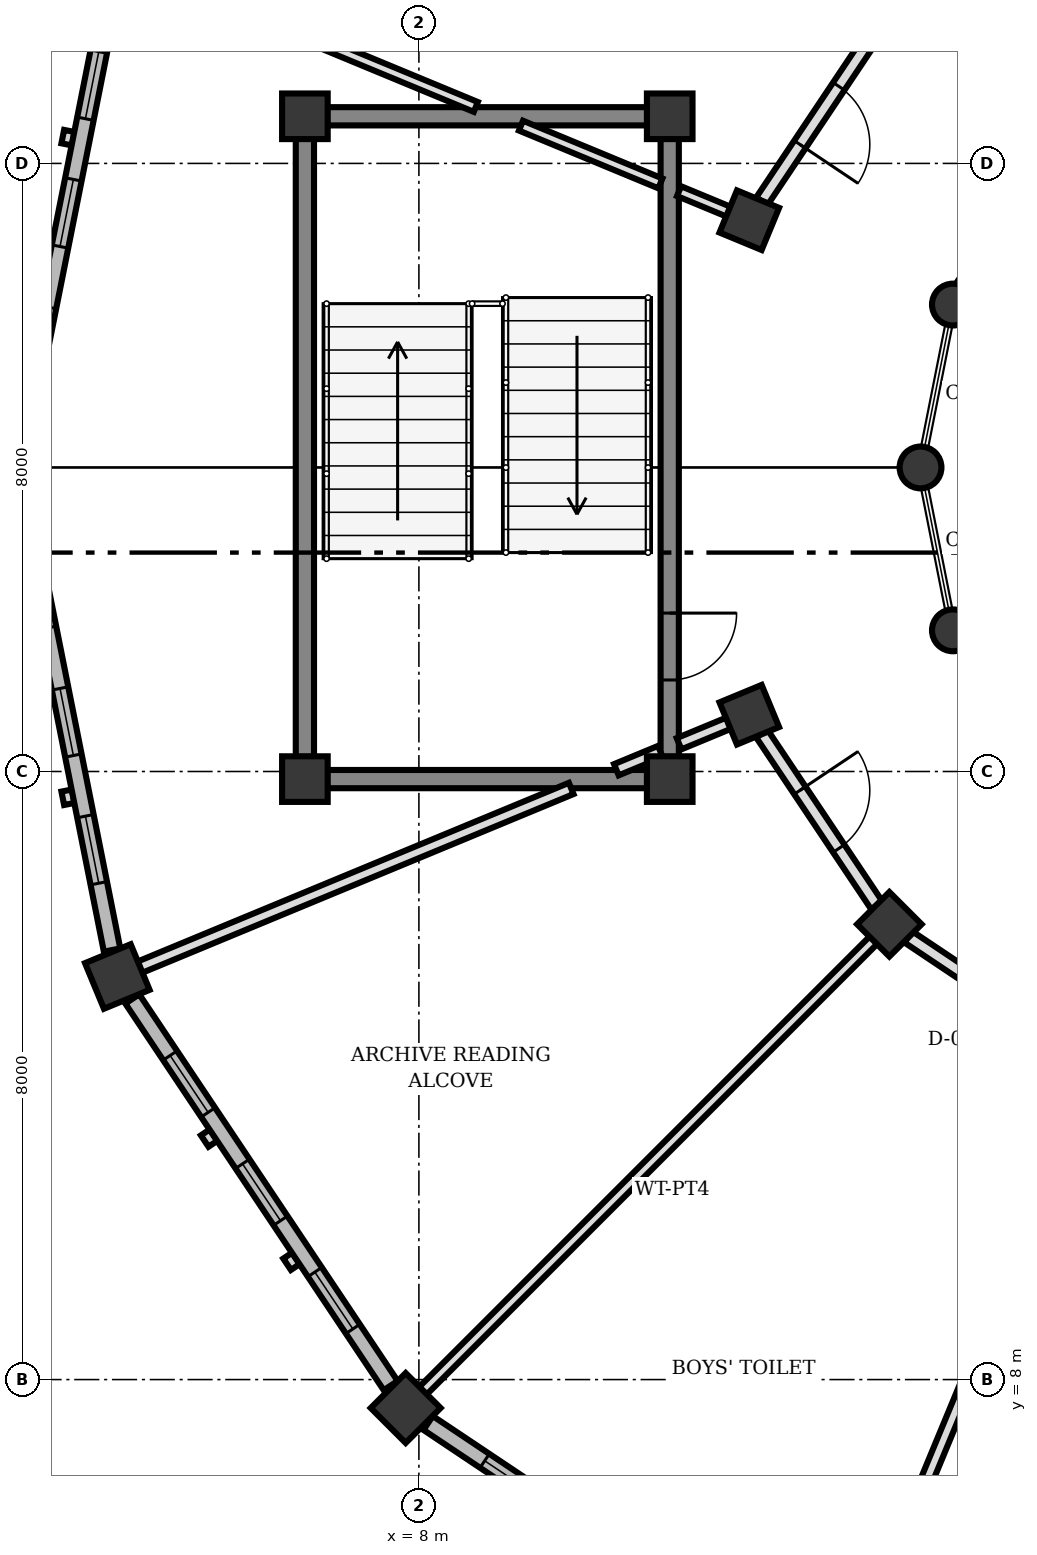
"""IFC4 building model, lengths in metres.
Left out: names, types, materials, properties, quantities, classifications, styles, units other than length and angle.
Written with IfcOpenShell. Run it as: python <this file> out.ifc"""

import sys

from ifc_helpers import new_model, si_unit, direction, frame, frame_2d, origin, origin_2d, place, context, subcontext, project, spatial, rectangle, circle, extrude, element, fill, save


model = new_model("IFC4")
c1 = context("Model", 3, precision=1e-05, world=origin(), true_north=direction((0.0, 1.0)))
c2 = subcontext(c1, "Body", "Model", "MODEL_VIEW")
j1 = project(units=[si_unit("LENGTHUNIT", "METRE"), si_unit("PLANEANGLEUNIT", "RADIAN")], contexts=[c1])
p1 = place(None, origin())
s1 = spatial("IfcSite", under=j1, at=p1, CompositionType="ELEMENT")
p2 = place(p1, origin())
s2 = spatial("IfcBuilding", under=s1, at=p2, CompositionType="ELEMENT")
p3 = place(p2, origin())
s3 = spatial("IfcBuildingStorey", under=s2, at=p3, CompositionType="ELEMENT", Elevation=0.0)
for number, where, z_axis, x_axis in (
    (1, (6.5, 15.9, 0.0), (0.0, 0.0, 1.0), (1.0, 0.0, 0.0)),
    (2, (11.3, 15.9, 0.0), (0.0, 0.0, 1.0), (1.0, 0.0, 0.0)),
    (3, (11.3, 24.62, 0.0), (0.0, 0.0, 1.0), (1.0, 0.0, 0.0)),
    (4, (6.5, 24.62, 0.0), (0.0, 0.0, 1.0), (1.0, 0.0, 0.0)),
):
    element("IfcColumn", number, at=place(p3, frame(where, z_axis=z_axis, x_axis=x_axis)), inside=s3, PredefinedType="COLUMN", context=c2, shape_type="SweptSolid", body=[
        extrude(rectangle(XDim=0.6, YDim=0.6, at=origin_2d()), origin(), (0.0, 0.0, 1.0), 4.5),
    ])
for number, where, z_axis, x_axis in (
    (5, (15.026, 22.143, 0.0), (0.0, 0.0, 1.0), (1.0, 0.0, 0.0)),
    (6, (14.6, 20.0, 0.0), (0.0, 0.0, 1.0), (1.0, 0.0, 0.0)),
    (7, (15.026, 17.857, 0.0), (0.0, 0.0, 1.0), (1.0, 0.0, 0.0)),
):
    element("IfcColumn", number, at=place(p3, frame(where, z_axis=z_axis, x_axis=x_axis)), inside=s3, PredefinedType="COLUMN", context=c2, shape_type="SweptSolid", body=[
        extrude(circle(Radius=0.275, at=origin_2d()), origin(), (0.0, 0.0, 1.0), 4.5),
    ])
for number, where, z_axis, x_axis in (
    (8, (12.347, 23.253, 0.0), (0.0, 0.0, 1.0), (-0.924, 0.383, 0.0)),
    (9, (12.347, 16.747, 0.0), (0.0, 0.0, 1.0), (-0.924, -0.383, 0.0)),
    (10, (14.19, 13.99, 0.0), (0.0, 0.0, 1.0), (-0.707, -0.707, 0.0)),
):
    element("IfcColumn", number, at=place(p3, frame(where, z_axis=z_axis, x_axis=x_axis)), inside=s3, PredefinedType="COLUMN", context=c2, shape_type="SweptSolid", body=[
        extrude(rectangle(XDim=0.6, YDim=0.6, at=origin_2d()), origin(), (0.0, 0.0, 1.0), 4.5),
    ])
for number, where, z_axis, x_axis in (
    (11, (4.032, 13.303, 0.0), (0.0, 0.0, 1.0), (-0.924, -0.383, 0.0)),
    (12, (7.826, 7.626, 0.0), (0.0, 0.0, 1.0), (-0.707, -0.707, 0.0)),
):
    element("IfcColumn", number, at=place(p3, frame(where, z_axis=z_axis, x_axis=x_axis)), inside=s3, PredefinedType="COLUMN", context=c2, shape_type="SweptSolid", body=[
        extrude(rectangle(XDim=0.65, YDim=0.65, at=origin_2d()), origin(), (0.0, 0.0, 1.0), 4.5),
    ])
p4 = place(p3, frame((16.086, 23.73, 0.0), z_axis=(0.0, 0.0, 1.0), x_axis=(-0.555287078904, -0.83165874011, 0.0)))
e13 = element("IfcWall", 13, at=p4, inside=s3, PredefinedType="SOLIDWALL", context=c2, shape_type="SweptSolid", body=[
    extrude(rectangle(XDim=1.632, YDim=0.24, at=frame_2d((0.816, 0.0))), origin(), (0.0, 0.0, 1.0), 3.55),
])
p5 = place(p3, frame((2.769, 20.348, 0.0), z_axis=(0.0, 0.0, 1.0), x_axis=(0.195110859746, 0.980781194971, 0.0)))
e14 = element("IfcWall", 14, at=p5, inside=s3, PredefinedType="SOLIDWALL", context=c2, shape_type="SweptSolid", body=[
    extrude(rectangle(XDim=6.119, YDim=0.22, at=frame_2d((3.06, 0.0))), origin(), (0.0, 0.0, 1.0), 3.55),
])
p6 = place(p5, frame((0.896, 0.0, 0.85)))
e15 = element("IfcOpeningElement", 15, at=p6, cuts=e14, PredefinedType="OPENING", context=c2, shape_type="SweptSolid", body=[
    extrude(rectangle(XDim=0.9, YDim=1.4, at=frame_2d((0.45, 0.7))), frame((0.0, 0.12, 0.0), z_axis=(0.0, -1.0, 0.0), x_axis=(1.0, 0.0, 0.0)), (0.0, 0.0, 1.0), 0.24),
])
p7 = place(p5, frame((2.609, 0.0, 0.85)))
e16 = element("IfcOpeningElement", 16, at=p7, cuts=e14, PredefinedType="OPENING", context=c2, shape_type="SweptSolid", body=[
    extrude(rectangle(XDim=0.9, YDim=1.4, at=frame_2d((0.45, 0.7))), frame((0.0, 0.12, 0.0), z_axis=(0.0, -1.0, 0.0), x_axis=(1.0, 0.0, 0.0)), (0.0, 0.0, 1.0), 0.24),
])
p8 = place(p5, frame((4.323, 0.0, 0.85)))
e17 = element("IfcOpeningElement", 17, at=p8, cuts=e14, PredefinedType="OPENING", context=c2, shape_type="SweptSolid", body=[
    extrude(rectangle(XDim=0.9, YDim=1.4, at=frame_2d((0.45, 0.7))), frame((0.0, 0.12, 0.0), z_axis=(0.0, -1.0, 0.0), x_axis=(1.0, 0.0, 0.0)), (0.0, 0.0, 1.0), 0.24),
])
p9 = place(p3, frame((3.963, 13.651, 0.0), z_axis=(0.0, 0.0, 1.0), x_axis=(-0.195110859746, 0.980781194971, 0.0)))
e18 = element("IfcWall", 18, at=p9, inside=s3, PredefinedType="SOLIDWALL", context=c2, shape_type="SweptSolid", body=[
    extrude(rectangle(XDim=6.119, YDim=0.22, at=frame_2d((3.06, 0.0))), origin(), (0.0, 0.0, 1.0), 3.55),
])
p10 = place(p9, frame((0.896, 0.0, 0.85)))
e19 = element("IfcOpeningElement", 19, at=p10, cuts=e18, PredefinedType="OPENING", context=c2, shape_type="SweptSolid", body=[
    extrude(rectangle(XDim=0.9, YDim=1.4, at=frame_2d((0.45, 0.7))), frame((0.0, 0.12, 0.0), z_axis=(0.0, -1.0, 0.0), x_axis=(1.0, 0.0, 0.0)), (0.0, 0.0, 1.0), 0.24),
])
p11 = place(p9, frame((2.609, 0.0, 0.85)))
e20 = element("IfcOpeningElement", 20, at=p11, cuts=e18, PredefinedType="OPENING", context=c2, shape_type="SweptSolid", body=[
    extrude(rectangle(XDim=0.9, YDim=1.4, at=frame_2d((0.45, 0.7))), frame((0.0, 0.12, 0.0), z_axis=(0.0, -1.0, 0.0), x_axis=(1.0, 0.0, 0.0)), (0.0, 0.0, 1.0), 0.24),
])
p12 = place(p9, frame((4.323, 0.0, 0.85)))
e21 = element("IfcOpeningElement", 21, at=p12, cuts=e18, PredefinedType="OPENING", context=c2, shape_type="SweptSolid", body=[
    extrude(rectangle(XDim=0.9, YDim=1.4, at=frame_2d((0.45, 0.7))), frame((0.0, 0.12, 0.0), z_axis=(0.0, -1.0, 0.0), x_axis=(1.0, 0.0, 0.0)), (0.0, 0.0, 1.0), 0.24),
])
p13 = place(p3, frame((7.629, 7.921, 0.0), z_axis=(0.0, 0.0, 1.0), x_axis=(-0.555657446161, 0.831411331728, 0.0)))
e22 = element("IfcWall", 22, at=p13, inside=s3, PredefinedType="SOLIDWALL", context=c2, shape_type="SweptSolid", body=[
    extrude(rectangle(XDim=6.119, YDim=0.22, at=frame_2d((3.059, 0.0))), origin(), (0.0, 0.0, 1.0), 3.55),
])
p14 = place(p13, frame((0.896, 0.0, 0.85)))
e23 = element("IfcOpeningElement", 23, at=p14, cuts=e22, PredefinedType="OPENING", context=c2, shape_type="SweptSolid", body=[
    extrude(rectangle(XDim=0.9, YDim=1.4, at=frame_2d((0.45, 0.7))), frame((0.0, 0.12, 0.0), z_axis=(0.0, -1.0, 0.0), x_axis=(1.0, 0.0, 0.0)), (0.0, 0.0, 1.0), 0.24),
])
p15 = place(p13, frame((2.609, 0.0, 0.85)))
e24 = element("IfcOpeningElement", 24, at=p15, cuts=e22, PredefinedType="OPENING", context=c2, shape_type="SweptSolid", body=[
    extrude(rectangle(XDim=0.9, YDim=1.4, at=frame_2d((0.45, 0.7))), frame((0.0, 0.12, 0.0), z_axis=(0.0, -1.0, 0.0), x_axis=(1.0, 0.0, 0.0)), (0.0, 0.0, 1.0), 0.24),
])
p16 = place(p13, frame((4.323, 0.0, 0.85)))
e25 = element("IfcOpeningElement", 25, at=p16, cuts=e22, PredefinedType="OPENING", context=c2, shape_type="SweptSolid", body=[
    extrude(rectangle(XDim=0.9, YDim=1.4, at=frame_2d((0.45, 0.7))), frame((0.0, 0.12, 0.0), z_axis=(0.0, -1.0, 0.0), x_axis=(1.0, 0.0, 0.0)), (0.0, 0.0, 1.0), 0.24),
])
p17 = place(p3, frame((13.208, 4.029, 0.0), z_axis=(0.0, 0.0, 1.0), x_axis=(-0.83139901156, 0.555675879967, 0.0)))
e26 = element("IfcWall", 26, at=p17, inside=s3, PredefinedType="SOLIDWALL", context=c2, shape_type="SweptSolid", body=[
    extrude(rectangle(XDim=6.118, YDim=0.22, at=frame_2d((3.059, 0.0))), origin(), (0.0, 0.0, 1.0), 3.55),
])
p18 = place(p17, frame((0.896, 0.0, 0.85)))
e27 = element("IfcOpeningElement", 27, at=p18, cuts=e26, PredefinedType="OPENING", context=c2, shape_type="SweptSolid", body=[
    extrude(rectangle(XDim=0.9, YDim=1.4, at=frame_2d((0.45, 0.7))), frame((0.0, 0.12, 0.0), z_axis=(0.0, -1.0, 0.0), x_axis=(1.0, 0.0, 0.0)), (0.0, 0.0, 1.0), 0.24),
])
p19 = place(p17, frame((2.609, 0.0, 0.85)))
e28 = element("IfcOpeningElement", 28, at=p19, cuts=e26, PredefinedType="OPENING", context=c2, shape_type="SweptSolid", body=[
    extrude(rectangle(XDim=0.9, YDim=1.4, at=frame_2d((0.45, 0.7))), frame((0.0, 0.12, 0.0), z_axis=(0.0, -1.0, 0.0), x_axis=(1.0, 0.0, 0.0)), (0.0, 0.0, 1.0), 0.24),
])
p20 = place(p17, frame((4.323, 0.0, 0.85)))
e29 = element("IfcOpeningElement", 29, at=p20, cuts=e26, PredefinedType="OPENING", context=c2, shape_type="SweptSolid", body=[
    extrude(rectangle(XDim=0.9, YDim=1.4, at=frame_2d((0.45, 0.7))), frame((0.0, 0.12, 0.0), z_axis=(0.0, -1.0, 0.0), x_axis=(1.0, 0.0, 0.0)), (0.0, 0.0, 1.0), 0.24),
])
p21 = place(p3, frame((6.5, 16.192, 0.0), z_axis=(0.0, 0.0, 1.0), x_axis=(0.0, 1.0, 0.0)))
e30 = element("IfcWall", 30, at=p21, inside=s3, PredefinedType="SHEAR", context=c2, shape_type="SweptSolid", body=[
    extrude(rectangle(XDim=8.136, YDim=0.24, at=frame_2d((4.068, 0.0))), origin(), (0.0, 0.0, 1.0), 4.24),
])
p22 = place(p3, frame((11.3, 24.328, 0.0), z_axis=(0.0, 0.0, 1.0), x_axis=(0.0, -1.0, 0.0)))
e31 = element("IfcWall", 31, at=p22, inside=s3, PredefinedType="SHEAR", context=c2, shape_type="SweptSolid", body=[
    extrude(rectangle(XDim=8.136, YDim=0.24, at=frame_2d((4.068, 0.0))), origin(), (0.0, 0.0, 1.0), 4.24),
])
p23 = place(p22, frame((6.244, 0.0, 0.0)))
e32 = element("IfcOpeningElement", 32, at=p23, cuts=e31, PredefinedType="OPENING", context=c2, shape_type="SweptSolid", body=[
    extrude(rectangle(XDim=0.88, YDim=2.1, at=frame_2d((0.44, 1.05))), frame((0.0, 0.13, 0.0), z_axis=(0.0, -1.0, 0.0), x_axis=(1.0, 0.0, 0.0)), (0.0, 0.0, 1.0), 0.26),
])
for number, where, z_axis, x_axis in (
    (33, (11.008, 15.9, 0.0), (0.0, 0.0, 1.0), (-1.0, 0.0, 0.0)),
    (34, (11.008, 24.62, 0.0), (0.0, 0.0, 1.0), (-1.0, 0.0, 0.0)),
):
    element("IfcWall", number, at=place(p3, frame(where, z_axis=z_axis, x_axis=x_axis)), inside=s3, PredefinedType="SHEAR", context=c2, shape_type="SweptSolid", body=[
        extrude(rectangle(XDim=4.216, YDim=0.24, at=frame_2d((2.108, 0.0))), origin(), (0.0, 0.0, 1.0), 4.24),
    ])
p24 = place(p3, frame((12.077, 23.364, 0.0), z_axis=(0.0, 0.0, 1.0), x_axis=(-0.923789734747, 0.382900151445, 0.0)))
e35 = element("IfcWall", 35, at=p24, inside=s3, PredefinedType="PARTITIONING", context=c2, shape_type="SweptSolid", body=[
    extrude(rectangle(XDim=0.708, YDim=0.14, at=frame_2d((0.354, 0.0))), origin(), (0.0, 0.0, 1.0), 4.2),
])
p25 = place(p3, frame((11.177, 23.737, 0.0), z_axis=(0.0, 0.0, 1.0), x_axis=(-0.923817443679, 0.382833293686, 0.0)))
e36 = element("IfcWall", 36, at=p25, inside=s3, PredefinedType="PARTITIONING", context=c2, shape_type="SweptSolid", body=[
    extrude(rectangle(XDim=1.985, YDim=0.14, at=frame_2d((0.993, 0.0))), origin(), (0.0, 0.0, 1.0), 4.2),
])
p26 = place(p3, frame((8.749, 24.743, 0.0), z_axis=(0.0, 0.0, 1.0), x_axis=(-0.923842829076, 0.38277203028, 0.0)))
e37 = element("IfcWall", 37, at=p26, inside=s3, PredefinedType="PARTITIONING", context=c2, shape_type="SweptSolid", body=[
    extrude(rectangle(XDim=4.789, YDim=0.14, at=frame_2d((2.395, 0.0))), origin(), (0.0, 0.0, 1.0), 4.2),
])
p27 = place(p3, frame((12.077, 16.636, 0.0), z_axis=(0.0, 0.0, 1.0), x_axis=(-0.923789734747, -0.382900151445, 0.0)))
e38 = element("IfcWall", 38, at=p27, inside=s3, PredefinedType="PARTITIONING", context=c2, shape_type="SweptSolid", body=[
    extrude(rectangle(XDim=0.708, YDim=0.16, at=frame_2d((0.354, 0.0))), origin(), (0.0, 0.0, 1.0), 3.552),
])
p28 = place(p3, frame((11.177, 16.263, 0.0), z_axis=(0.0, 0.0, 1.0), x_axis=(-0.923812676193, -0.382844797933, 0.0)))
e39 = element("IfcWall", 39, at=p28, inside=s3, PredefinedType="PARTITIONING", context=c2, shape_type="SweptSolid", body=[
    extrude(rectangle(XDim=0.627, YDim=0.16, at=frame_2d((0.313, 0.0))), origin(), (0.0, 0.0, 1.0), 3.552),
])
p29 = place(p3, frame((10.004, 15.777, 0.0), z_axis=(0.0, 0.0, 1.0), x_axis=(-0.923837705987, -0.382784394923, 0.0)))
e40 = element("IfcWall", 40, at=p29, inside=s3, PredefinedType="PARTITIONING", context=c2, shape_type="SweptSolid", body=[
    extrude(rectangle(XDim=6.147, YDim=0.16, at=frame_2d((3.074, 0.0))), origin(), (0.0, 0.0, 1.0), 3.552),
])
p30 = place(p3, frame((13.984, 13.784, 0.0), z_axis=(0.0, 0.0, 1.0), x_axis=(-0.707106781187, -0.707106781187, 0.0)))
e41 = element("IfcWall", 41, at=p30, inside=s3, PredefinedType="PARTITIONING", context=c2, shape_type="SweptSolid", body=[
    extrude(rectangle(XDim=8.392, YDim=0.14, at=frame_2d((4.196, 0.0))), origin(), (0.0, 0.0, 1.0), 3.552),
])
p31 = place(p3, frame((16.836, 11.877, 0.0), z_axis=(0.0, 0.0, 1.0), x_axis=(-0.382780060664, -0.923839501839, 0.0)))
e42 = element("IfcWall", 42, at=p31, inside=s3, PredefinedType="PARTITIONING", context=c2, shape_type="SweptSolid", body=[
    extrude(rectangle(XDim=8.391, YDim=0.16, at=frame_2d((4.196, 0.0))), origin(), (0.0, 0.0, 1.0), 3.552),
])
p32 = place(p3, frame((14.025, 25.762, 0.0), z_axis=(0.0, 0.0, 1.0), x_axis=(-0.556128339679, -0.831096426298, 0.0)))
e43 = element("IfcWall", 43, at=p32, inside=s3, PredefinedType="PARTITIONING", context=c2, shape_type="SweptSolid", body=[
    extrude(rectangle(XDim=2.72, YDim=0.18, at=frame_2d((1.36, 0.0))), origin(), (0.0, 0.0, 1.0), 3.552),
])
p33 = place(p32, frame((0.9, 0.0, 0.0)))
e44 = element("IfcOpeningElement", 44, at=p33, cuts=e43, PredefinedType="OPENING", context=c2, shape_type="SweptSolid", body=[
    extrude(rectangle(XDim=0.92, YDim=2.1, at=frame_2d((0.46, 1.05))), frame((0.0, 0.1, 0.0), z_axis=(0.0, -1.0, 0.0), x_axis=(1.0, 0.0, 0.0)), (0.0, 0.0, 1.0), 0.2),
])
p34 = place(p3, frame((12.512, 16.499, 0.0), z_axis=(0.0, 0.0, 1.0), x_axis=(0.556128339679, -0.831096426298, 0.0)))
e45 = element("IfcWall", 45, at=p34, inside=s3, PredefinedType="PARTITIONING", context=c2, shape_type="SweptSolid", body=[
    extrude(rectangle(XDim=2.72, YDim=0.18, at=frame_2d((1.36, 0.0))), origin(), (0.0, 0.0, 1.0), 3.552),
])
p35 = place(p34, frame((0.9, 0.0, 0.0)))
e46 = element("IfcOpeningElement", 46, at=p35, cuts=e45, PredefinedType="OPENING", context=c2, shape_type="SweptSolid", body=[
    extrude(rectangle(XDim=0.92, YDim=2.1, at=frame_2d((0.46, 1.05))), frame((0.0, 0.1, 0.0), z_axis=(0.0, -1.0, 0.0), x_axis=(1.0, 0.0, 0.0)), (0.0, 0.0, 1.0), 0.2),
])
p36 = place(p3, frame((14.438, 13.825, 0.0), z_axis=(0.0, 0.0, 1.0), x_axis=(0.831096426298, -0.556128339679, 0.0)))
e47 = element("IfcWall", 47, at=p36, inside=s3, PredefinedType="PARTITIONING", context=c2, shape_type="SweptSolid", body=[
    extrude(rectangle(XDim=2.72, YDim=0.18, at=frame_2d((1.36, 0.0))), origin(), (0.0, 0.0, 1.0), 3.552),
])
p37 = place(p36, frame((0.9, 0.0, 0.0)))
e48 = element("IfcOpeningElement", 48, at=p37, cuts=e47, PredefinedType="OPENING", context=c2, shape_type="SweptSolid", body=[
    extrude(rectangle(XDim=0.92, YDim=2.1, at=frame_2d((0.46, 1.05))), frame((0.0, 0.1, 0.0), z_axis=(0.0, -1.0, 0.0), x_axis=(1.0, 0.0, 0.0)), (0.0, 0.0, 1.0), 0.2),
])
p38 = place(p7, origin())
e49 = element("IfcWindow", 49, at=p38, inside=s3, PartitioningType="SINGLE_PANEL", PredefinedType="WINDOW", context=c2, shape_type="SweptSolid", body=[
    extrude(rectangle(XDim=0.9, YDim=1.4, at=frame_2d((0.45, 0.7))), frame((0.0, 0.03, 0.0), z_axis=(0.0, -1.0, 0.0), x_axis=(1.0, 0.0, 0.0)), (0.0, 0.0, 1.0), 0.06),
])
fill(e16, e49)
p39 = place(p8, origin())
e50 = element("IfcWindow", 50, at=p39, inside=s3, PartitioningType="SINGLE_PANEL", PredefinedType="WINDOW", context=c2, shape_type="SweptSolid", body=[
    extrude(rectangle(XDim=0.9, YDim=1.4, at=frame_2d((0.45, 0.7))), frame((0.0, 0.03, 0.0), z_axis=(0.0, -1.0, 0.0), x_axis=(1.0, 0.0, 0.0)), (0.0, 0.0, 1.0), 0.06),
])
fill(e17, e50)
p40 = place(p10, origin())
e51 = element("IfcWindow", 51, at=p40, inside=s3, PartitioningType="SINGLE_PANEL", PredefinedType="WINDOW", context=c2, shape_type="SweptSolid", body=[
    extrude(rectangle(XDim=0.9, YDim=1.4, at=frame_2d((0.45, 0.7))), frame((0.0, 0.03, 0.0), z_axis=(0.0, -1.0, 0.0), x_axis=(1.0, 0.0, 0.0)), (0.0, 0.0, 1.0), 0.06),
])
fill(e19, e51)
p41 = place(p11, origin())
e52 = element("IfcWindow", 52, at=p41, inside=s3, PartitioningType="SINGLE_PANEL", PredefinedType="WINDOW", context=c2, shape_type="SweptSolid", body=[
    extrude(rectangle(XDim=0.9, YDim=1.4, at=frame_2d((0.45, 0.7))), frame((0.0, 0.03, 0.0), z_axis=(0.0, -1.0, 0.0), x_axis=(1.0, 0.0, 0.0)), (0.0, 0.0, 1.0), 0.06),
])
fill(e20, e52)
p42 = place(p14, origin())
e53 = element("IfcWindow", 53, at=p42, inside=s3, PartitioningType="SINGLE_PANEL", PredefinedType="WINDOW", context=c2, shape_type="SweptSolid", body=[
    extrude(rectangle(XDim=0.9, YDim=1.4, at=frame_2d((0.45, 0.7))), frame((0.0, 0.03, 0.0), z_axis=(0.0, -1.0, 0.0), x_axis=(1.0, 0.0, 0.0)), (0.0, 0.0, 1.0), 0.06),
])
fill(e23, e53)
p43 = place(p15, origin())
e54 = element("IfcWindow", 54, at=p43, inside=s3, PartitioningType="SINGLE_PANEL", PredefinedType="WINDOW", context=c2, shape_type="SweptSolid", body=[
    extrude(rectangle(XDim=0.9, YDim=1.4, at=frame_2d((0.45, 0.7))), frame((0.0, 0.03, 0.0), z_axis=(0.0, -1.0, 0.0), x_axis=(1.0, 0.0, 0.0)), (0.0, 0.0, 1.0), 0.06),
])
fill(e24, e54)
p44 = place(p16, origin())
e55 = element("IfcWindow", 55, at=p44, inside=s3, PartitioningType="SINGLE_PANEL", PredefinedType="WINDOW", context=c2, shape_type="SweptSolid", body=[
    extrude(rectangle(XDim=0.9, YDim=1.4, at=frame_2d((0.45, 0.7))), frame((0.0, 0.03, 0.0), z_axis=(0.0, -1.0, 0.0), x_axis=(1.0, 0.0, 0.0)), (0.0, 0.0, 1.0), 0.06),
])
fill(e25, e55)
p45 = place(p20, origin())
e56 = element("IfcWindow", 56, at=p45, inside=s3, PartitioningType="SINGLE_PANEL", PredefinedType="WINDOW", context=c2, shape_type="SweptSolid", body=[
    extrude(rectangle(XDim=0.9, YDim=1.4, at=frame_2d((0.45, 0.7))), frame((0.0, 0.03, 0.0), z_axis=(0.0, -1.0, 0.0), x_axis=(1.0, 0.0, 0.0)), (0.0, 0.0, 1.0), 0.06),
])
fill(e29, e56)
p46 = place(p23, origin())
e57 = element("IfcDoor", 57, at=p46, inside=s3, OperationType="SINGLE_SWING_LEFT", PredefinedType="DOOR", context=c2, shape_type="SweptSolid", body=[
    extrude(rectangle(XDim=0.88, YDim=2.1, at=frame_2d((0.44, 1.05))), frame((0.0, 0.025, 0.0), z_axis=(0.0, -1.0, 0.0), x_axis=(1.0, 0.0, 0.0)), (0.0, 0.0, 1.0), 0.05),
])
fill(e32, e57)
p47 = place(p33, origin())
e58 = element("IfcDoor", 58, at=p47, inside=s3, OperationType="SINGLE_SWING_RIGHT", PredefinedType="DOOR", context=c2, shape_type="SweptSolid", body=[
    extrude(rectangle(XDim=0.92, YDim=2.1, at=frame_2d((0.46, 1.05))), frame((0.0, 0.025, 0.0), z_axis=(0.0, -1.0, 0.0), x_axis=(1.0, 0.0, 0.0)), (0.0, 0.0, 1.0), 0.05),
])
fill(e44, e58)
p48 = place(p35, origin())
e59 = element("IfcDoor", 59, at=p48, inside=s3, OperationType="SINGLE_SWING_LEFT", PredefinedType="DOOR", context=c2, shape_type="SweptSolid", body=[
    extrude(rectangle(XDim=0.92, YDim=2.1, at=frame_2d((0.46, 1.05))), frame((0.0, 0.025, 0.0), z_axis=(0.0, -1.0, 0.0), x_axis=(1.0, 0.0, 0.0)), (0.0, 0.0, 1.0), 0.05),
])
fill(e46, e59)
save(model, sys.argv[1])
